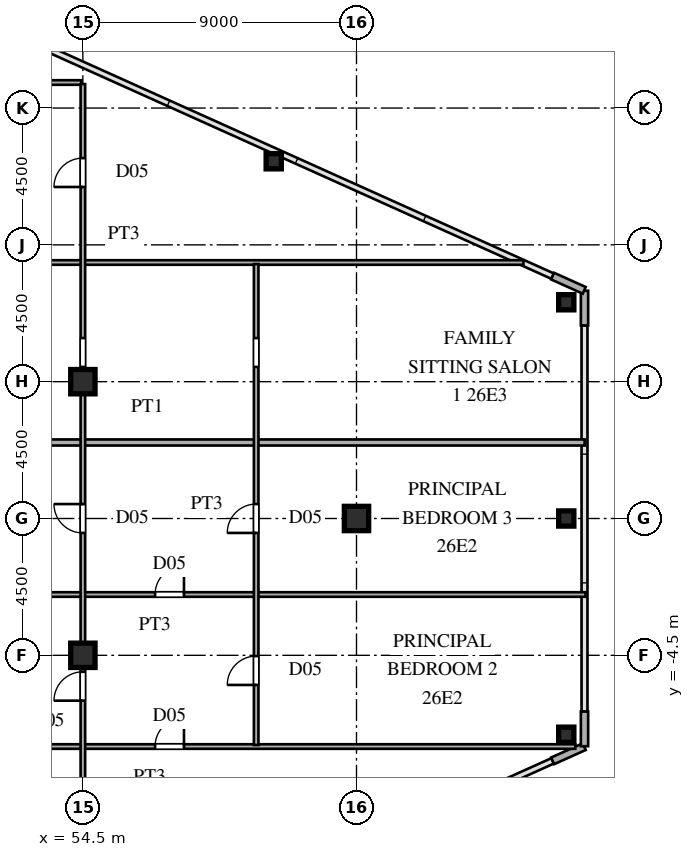
"""IFC4 building model, lengths in metres.
Left out: names, types, materials, properties, quantities, classifications, styles, units other than length and angle.
Written with IfcOpenShell. Run it as: python <this file> out.ifc"""

import sys

from ifc_helpers import new_model, si_unit, direction, frame, frame_2d, origin, origin_2d, place, context, subcontext, project, spatial, rectangle, hollow_rectangle, i_section, extrude, source, transform, mapped, element, fill, save


model = new_model("IFC4")
c1 = context("Model", 3, precision=1e-05, world=origin(), true_north=direction((0.0, 1.0)))
c2 = subcontext(c1, "Body", "Model", "MODEL_VIEW")
j1 = project(units=[si_unit("LENGTHUNIT", "METRE"), si_unit("PLANEANGLEUNIT", "RADIAN")], contexts=[c1])
p1 = place(None, origin())
s1 = spatial("IfcSite", under=j1, at=p1, CompositionType="ELEMENT")
p2 = place(p1, origin())
s2 = spatial("IfcBuilding", under=s1, at=p2, CompositionType="ELEMENT")
p3 = place(p2, frame((0.0, 0.0, 99.6)))
s3 = spatial("IfcBuildingStorey", under=s2, at=p3, CompositionType="ELEMENT", Elevation=99.6)
m1 = source(origin(), c2, "Body", "SweptSolid", [
    extrude(i_section(OverallWidth=0.8, OverallDepth=0.8, WebThickness=0.032, FlangeThickness=0.05, at=origin_2d()), origin(), (0.0, 0.0, 1.0), 3.6),
])
for number, where, z_axis, x_axis in (
    (1, (54.5, -4.5, 0.0), (0.0, 0.0, 1.0), (1.0, 0.0, 0.0)),
    (2, (54.5, 4.5, 0.0), (0.0, 0.0, 1.0), (1.0, 0.0, 0.0)),
    (3, (63.5, 0.0, 0.0), (0.0, 0.0, 1.0), (1.0, 0.0, 0.0)),
):
    element("IfcColumn", number, at=place(p3, frame(where, z_axis=z_axis, x_axis=x_axis)), inside=s3, PredefinedType="COLUMN", context=c2, shape_type="MappedRepresentation", body=[
        mapped(m1, transform((0.0, 0.0, 0.0), scale=1.0)),
    ])
m2 = source(origin(), c2, "Body", "SweptSolid", [
    extrude(hollow_rectangle(XDim=0.5, YDim=0.5, WallThickness=0.02, at=origin_2d()), origin(), (0.0, 0.0, 1.0), 3.6),
])
for number, where, z_axis, x_axis in (
    (4, (70.4, -7.112, 0.0), (0.0, 0.0, 1.0), (1.0, 0.0, 0.0)),
    (5, (70.4, 7.112, 0.0), (0.0, 0.0, 1.0), (1.0, 0.0, 0.0)),
    (6, (60.778, 11.749, 0.0), (0.0, 0.0, 1.0), (1.0, 0.0, 0.0)),
    (7, (70.4, 0.0, 0.0), (0.0, 0.0, 1.0), (1.0, 0.0, 0.0)),
):
    element("IfcColumn", number, at=place(p3, frame(where, z_axis=z_axis, x_axis=x_axis)), inside=s3, PredefinedType="COLUMN", context=c2, shape_type="MappedRepresentation", body=[
        mapped(m2, transform((0.0, 0.0, 0.0), scale=1.0)),
    ])
for number, where, z_axis, x_axis in (
    (8, (69.951, -7.972, 0.0), (0.0, 0.0, 1.0), (0.912, 0.41, 0.0)),
    (9, (71.0, -7.49, 0.0), (0.0, 0.0, 1.0), (0.0, 1.0, 0.0)),
    (10, (71.0, 6.35, 0.0), (0.0, 0.0, 1.0), (0.0, 1.0, 0.0)),
    (11, (70.991, 7.504, 0.0), (0.0, 0.0, 1.0), (-0.912, 0.41, 0.0)),
):
    element("IfcWall", number, at=place(p3, frame(where, z_axis=z_axis, x_axis=x_axis)), inside=s3, PredefinedType="SOLIDWALL", context=c2, shape_type="SweptSolid", body=[
        extrude(rectangle(XDim=1.14, YDim=0.24, at=frame_2d((0.57, 0.0))), origin(), (0.0, 0.0, 1.0), 3.38),
    ])
p4 = place(p3, frame((42.7, -7.5, 0.0), z_axis=(0.0, 0.0, 1.0), x_axis=(1.0, 0.0, 0.0)))
e12 = element("IfcWall", 12, at=p4, inside=s3, PredefinedType="PARTITIONING", context=c2, shape_type="SweptSolid", body=[
    extrude(rectangle(XDim=27.995, YDim=0.15, at=frame_2d((13.998, 0.0))), origin(), (0.0, 0.0, 1.0), 3.38),
])
p5 = place(p4, frame((2.438, 0.0, 0.0)))
e13 = element("IfcOpeningElement", 13, at=p5, cuts=e12, PredefinedType="OPENING", context=c2, shape_type="SweptSolid", body=[
    extrude(rectangle(XDim=0.95, YDim=2.15, at=frame_2d((0.475, 1.075))), frame((0.0, 0.085, 0.0), z_axis=(0.0, -1.0, 0.0), x_axis=(1.0, 0.0, 0.0)), (0.0, 0.0, 1.0), 0.17),
])
p6 = place(p4, frame((14.175, 0.0, 0.0)))
e14 = element("IfcOpeningElement", 14, at=p6, cuts=e12, PredefinedType="OPENING", context=c2, shape_type="SweptSolid", body=[
    extrude(rectangle(XDim=0.95, YDim=2.15, at=frame_2d((0.475, 1.075))), frame((0.0, 0.085, 0.0), z_axis=(0.0, -1.0, 0.0), x_axis=(1.0, 0.0, 0.0)), (0.0, 0.0, 1.0), 0.17),
])
p7 = place(p3, frame((42.7, -2.5, 0.0), z_axis=(0.0, 0.0, 1.0), x_axis=(1.0, 0.0, 0.0)))
e15 = element("IfcWall", 15, at=p7, inside=s3, PredefinedType="PARTITIONING", context=c2, shape_type="SweptSolid", body=[
    extrude(rectangle(XDim=28.335, YDim=0.15, at=frame_2d((14.167, 0.0))), origin(), (0.0, 0.0, 1.0), 3.38),
])
p8 = place(p7, frame((2.438, 0.0, 0.0)))
e16 = element("IfcOpeningElement", 16, at=p8, cuts=e15, PredefinedType="OPENING", context=c2, shape_type="SweptSolid", body=[
    extrude(rectangle(XDim=0.95, YDim=2.15, at=frame_2d((0.475, 1.075))), frame((0.0, 0.085, 0.0), z_axis=(0.0, -1.0, 0.0), x_axis=(1.0, 0.0, 0.0)), (0.0, 0.0, 1.0), 0.17),
])
p9 = place(p7, frame((14.175, 0.0, 0.0)))
e17 = element("IfcOpeningElement", 17, at=p9, cuts=e15, PredefinedType="OPENING", context=c2, shape_type="SweptSolid", body=[
    extrude(rectangle(XDim=0.95, YDim=2.15, at=frame_2d((0.475, 1.075))), frame((0.0, 0.085, 0.0), z_axis=(0.0, -1.0, 0.0), x_axis=(1.0, 0.0, 0.0)), (0.0, 0.0, 1.0), 0.17),
])
p10 = place(p3, frame((39.93, 2.5, 0.0), z_axis=(0.0, 0.0, 1.0), x_axis=(1.0, 0.0, 0.0)))
e18 = element("IfcWall", 18, at=p10, inside=s3, PredefinedType="PARTITIONING", context=c2, shape_type="SweptSolid", body=[
    extrude(rectangle(XDim=31.075, YDim=0.2, at=frame_2d((15.538, 0.0))), origin(), (0.0, 0.0, 1.0), 3.38),
])
p11 = place(p3, frame((42.7, 8.42, 0.0), z_axis=(0.0, 0.0, 1.0), x_axis=(1.0, 0.0, 0.0)))
e19 = element("IfcWall", 19, at=p11, inside=s3, PredefinedType="PARTITIONING", context=c2, shape_type="SweptSolid", body=[
    extrude(rectangle(XDim=26.292, YDim=0.15, at=frame_2d((13.146, 0.0))), origin(), (0.0, 0.0, 1.0), 3.38),
])
p12 = place(p11, frame((2.438, 0.0, 0.0)))
e20 = element("IfcOpeningElement", 20, at=p12, cuts=e19, PredefinedType="OPENING", context=c2, shape_type="SweptSolid", body=[
    extrude(rectangle(XDim=0.95, YDim=2.15, at=frame_2d((0.475, 1.075))), frame((0.0, 0.085, 0.0), z_axis=(0.0, -1.0, 0.0), x_axis=(1.0, 0.0, 0.0)), (0.0, 0.0, 1.0), 0.17),
])
p13 = place(p3, frame((42.7, 14.34, 0.0), z_axis=(0.0, 0.0, 1.0), x_axis=(1.0, 0.0, 0.0)))
e21 = element("IfcWall", 21, at=p13, inside=s3, PredefinedType="PARTITIONING", context=c2, shape_type="SweptSolid", body=[
    extrude(rectangle(XDim=11.75, YDim=0.15, at=frame_2d((5.875, 0.0))), origin(), (0.0, 0.0, 1.0), 3.38),
])
p14 = place(p13, frame((3.255, 0.0, 0.0)))
e22 = element("IfcOpeningElement", 22, at=p14, cuts=e21, PredefinedType="OPENING", context=c2, shape_type="SweptSolid", body=[
    extrude(rectangle(XDim=0.95, YDim=2.15, at=frame_2d((0.475, 1.075))), frame((0.0, 0.085, 0.0), z_axis=(0.0, -1.0, 0.0), x_axis=(1.0, 0.0, 0.0)), (0.0, 0.0, 1.0), 0.17),
])
p15 = place(p3, frame((54.5, -12.45, 0.0), z_axis=(0.0, 0.0, 1.0), x_axis=(0.0, 1.0, 0.0)))
e23 = element("IfcWall", 23, at=p15, inside=s3, PredefinedType="PARTITIONING", context=c2, shape_type="SweptSolid", body=[
    extrude(rectangle(XDim=26.738, YDim=0.15, at=frame_2d((13.369, 0.0))), origin(), (0.0, 0.0, 1.0), 2.68),
])
p16 = place(p15, frame((6.458, 0.0, 0.0)))
e24 = element("IfcOpeningElement", 24, at=p16, cuts=e23, PredefinedType="OPENING", context=c2, shape_type="SweptSolid", body=[
    extrude(rectangle(XDim=0.95, YDim=2.15, at=frame_2d((0.475, 1.075))), frame((0.0, 0.085, 0.0), z_axis=(0.0, -1.0, 0.0), x_axis=(1.0, 0.0, 0.0)), (0.0, 0.0, 1.0), 0.17),
])
p17 = place(p15, frame((11.975, 0.0, 0.0)))
e25 = element("IfcOpeningElement", 25, at=p17, cuts=e23, PredefinedType="OPENING", context=c2, shape_type="SweptSolid", body=[
    extrude(rectangle(XDim=0.95, YDim=2.15, at=frame_2d((0.475, 1.075))), frame((0.0, 0.085, 0.0), z_axis=(0.0, -1.0, 0.0), x_axis=(1.0, 0.0, 0.0)), (0.0, 0.0, 1.0), 0.17),
])
p18 = place(p15, frame((23.354, 0.0, 0.0)))
e26 = element("IfcOpeningElement", 26, at=p18, cuts=e23, PredefinedType="OPENING", context=c2, shape_type="SweptSolid", body=[
    extrude(rectangle(XDim=0.95, YDim=2.15, at=frame_2d((0.475, 1.075))), frame((0.0, 0.085, 0.0), z_axis=(0.0, -1.0, 0.0), x_axis=(1.0, 0.0, 0.0)), (0.0, 0.0, 1.0), 0.17),
])
p19 = place(p15, frame((17.435, 0.0, 0.0)))
e27 = element("IfcOpeningElement", 27, at=p19, cuts=e23, PredefinedType="OPENING", context=c2, shape_type="SweptSolid", body=[
    extrude(rectangle(XDim=0.95, YDim=2.15, at=frame_2d((0.475, 1.075))), frame((0.0, 0.085, 0.0), z_axis=(0.0, -1.0, 0.0), x_axis=(1.0, 0.0, 0.0)), (0.0, 0.0, 1.0), 0.17),
])
p20 = place(p3, frame((60.2, -7.45, 0.0), z_axis=(0.0, 0.0, 1.0), x_axis=(0.0, 1.0, 0.0)))
e28 = element("IfcWall", 28, at=p20, inside=s3, PredefinedType="PARTITIONING", context=c2, shape_type="SweptSolid", body=[
    extrude(rectangle(XDim=15.819, YDim=0.15, at=frame_2d((7.909, 0.0))), origin(), (0.0, 0.0, 1.0), 3.38),
])
p21 = place(p20, frame((1.975, 0.0, 0.0)))
e29 = element("IfcOpeningElement", 29, at=p21, cuts=e28, PredefinedType="OPENING", context=c2, shape_type="SweptSolid", body=[
    extrude(rectangle(XDim=0.95, YDim=2.15, at=frame_2d((0.475, 1.075))), frame((0.0, 0.085, 0.0), z_axis=(0.0, -1.0, 0.0), x_axis=(1.0, 0.0, 0.0)), (0.0, 0.0, 1.0), 0.17),
])
p22 = place(p20, frame((6.975, 0.0, 0.0)))
e30 = element("IfcOpeningElement", 30, at=p22, cuts=e28, PredefinedType="OPENING", context=c2, shape_type="SweptSolid", body=[
    extrude(rectangle(XDim=0.95, YDim=2.15, at=frame_2d((0.475, 1.075))), frame((0.0, 0.085, 0.0), z_axis=(0.0, -1.0, 0.0), x_axis=(1.0, 0.0, 0.0)), (0.0, 0.0, 1.0), 0.17),
])
p23 = place(p20, frame((12.435, 0.0, 0.0)))
e31 = element("IfcOpeningElement", 31, at=p23, cuts=e28, PredefinedType="OPENING", context=c2, shape_type="SweptSolid", body=[
    extrude(rectangle(XDim=0.95, YDim=2.15, at=frame_2d((0.475, 1.075))), frame((0.0, 0.085, 0.0), z_axis=(0.0, -1.0, 0.0), x_axis=(1.0, 0.0, 0.0)), (0.0, 0.0, 1.0), 0.17),
])
m3 = source(origin(), c2, "Body", "SweptSolid", [
    extrude(rectangle(XDim=0.95, YDim=2.15, at=frame_2d((0.475, 1.075))), frame((0.0, 0.025, 0.0), z_axis=(0.0, -1.0, 0.0), x_axis=(1.0, 0.0, 0.0)), (0.0, 0.0, 1.0), 0.05),
])
p24 = place(p6, origin())
e32 = element("IfcDoor", 32, at=p24, inside=s3, OperationType="SINGLE_SWING_RIGHT", PredefinedType="DOOR", context=c2, shape_type="MappedRepresentation", body=[
    mapped(m3, transform((0.0, 0.0, 0.0), scale=1.0)),
])
fill(e14, e32)
p25 = place(p9, origin())
e33 = element("IfcDoor", 33, at=p25, inside=s3, OperationType="SINGLE_SWING_RIGHT", PredefinedType="DOOR", context=c2, shape_type="MappedRepresentation", body=[
    mapped(m3, transform((0.0, 0.0, 0.0), scale=1.0)),
])
fill(e17, e33)
p26 = place(p16, origin())
e34 = element("IfcDoor", 34, at=p26, inside=s3, OperationType="SINGLE_SWING_LEFT", PredefinedType="DOOR", context=c2, shape_type="MappedRepresentation", body=[
    mapped(m3, transform((0.0, 0.0, 0.0), scale=1.0)),
])
fill(e24, e34)
p27 = place(p17, origin())
e35 = element("IfcDoor", 35, at=p27, inside=s3, OperationType="SINGLE_SWING_RIGHT", PredefinedType="DOOR", context=c2, shape_type="MappedRepresentation", body=[
    mapped(m3, transform((0.0, 0.0, 0.0), scale=1.0)),
])
fill(e25, e35)
p28 = place(p18, origin())
e36 = element("IfcDoor", 36, at=p28, inside=s3, OperationType="SINGLE_SWING_LEFT", PredefinedType="DOOR", context=c2, shape_type="MappedRepresentation", body=[
    mapped(m3, transform((0.0, 0.0, 0.0), scale=1.0)),
])
fill(e26, e36)
p29 = place(p21, origin())
e37 = element("IfcDoor", 37, at=p29, inside=s3, OperationType="SINGLE_SWING_LEFT", PredefinedType="DOOR", context=c2, shape_type="MappedRepresentation", body=[
    mapped(m3, transform((0.0, 0.0, 0.0), scale=1.0)),
])
fill(e29, e37)
p30 = place(p22, origin())
e38 = element("IfcDoor", 38, at=p30, inside=s3, OperationType="SINGLE_SWING_LEFT", PredefinedType="DOOR", context=c2, shape_type="MappedRepresentation", body=[
    mapped(m3, transform((0.0, 0.0, 0.0), scale=1.0)),
])
fill(e30, e38)
save(model, sys.argv[1])
